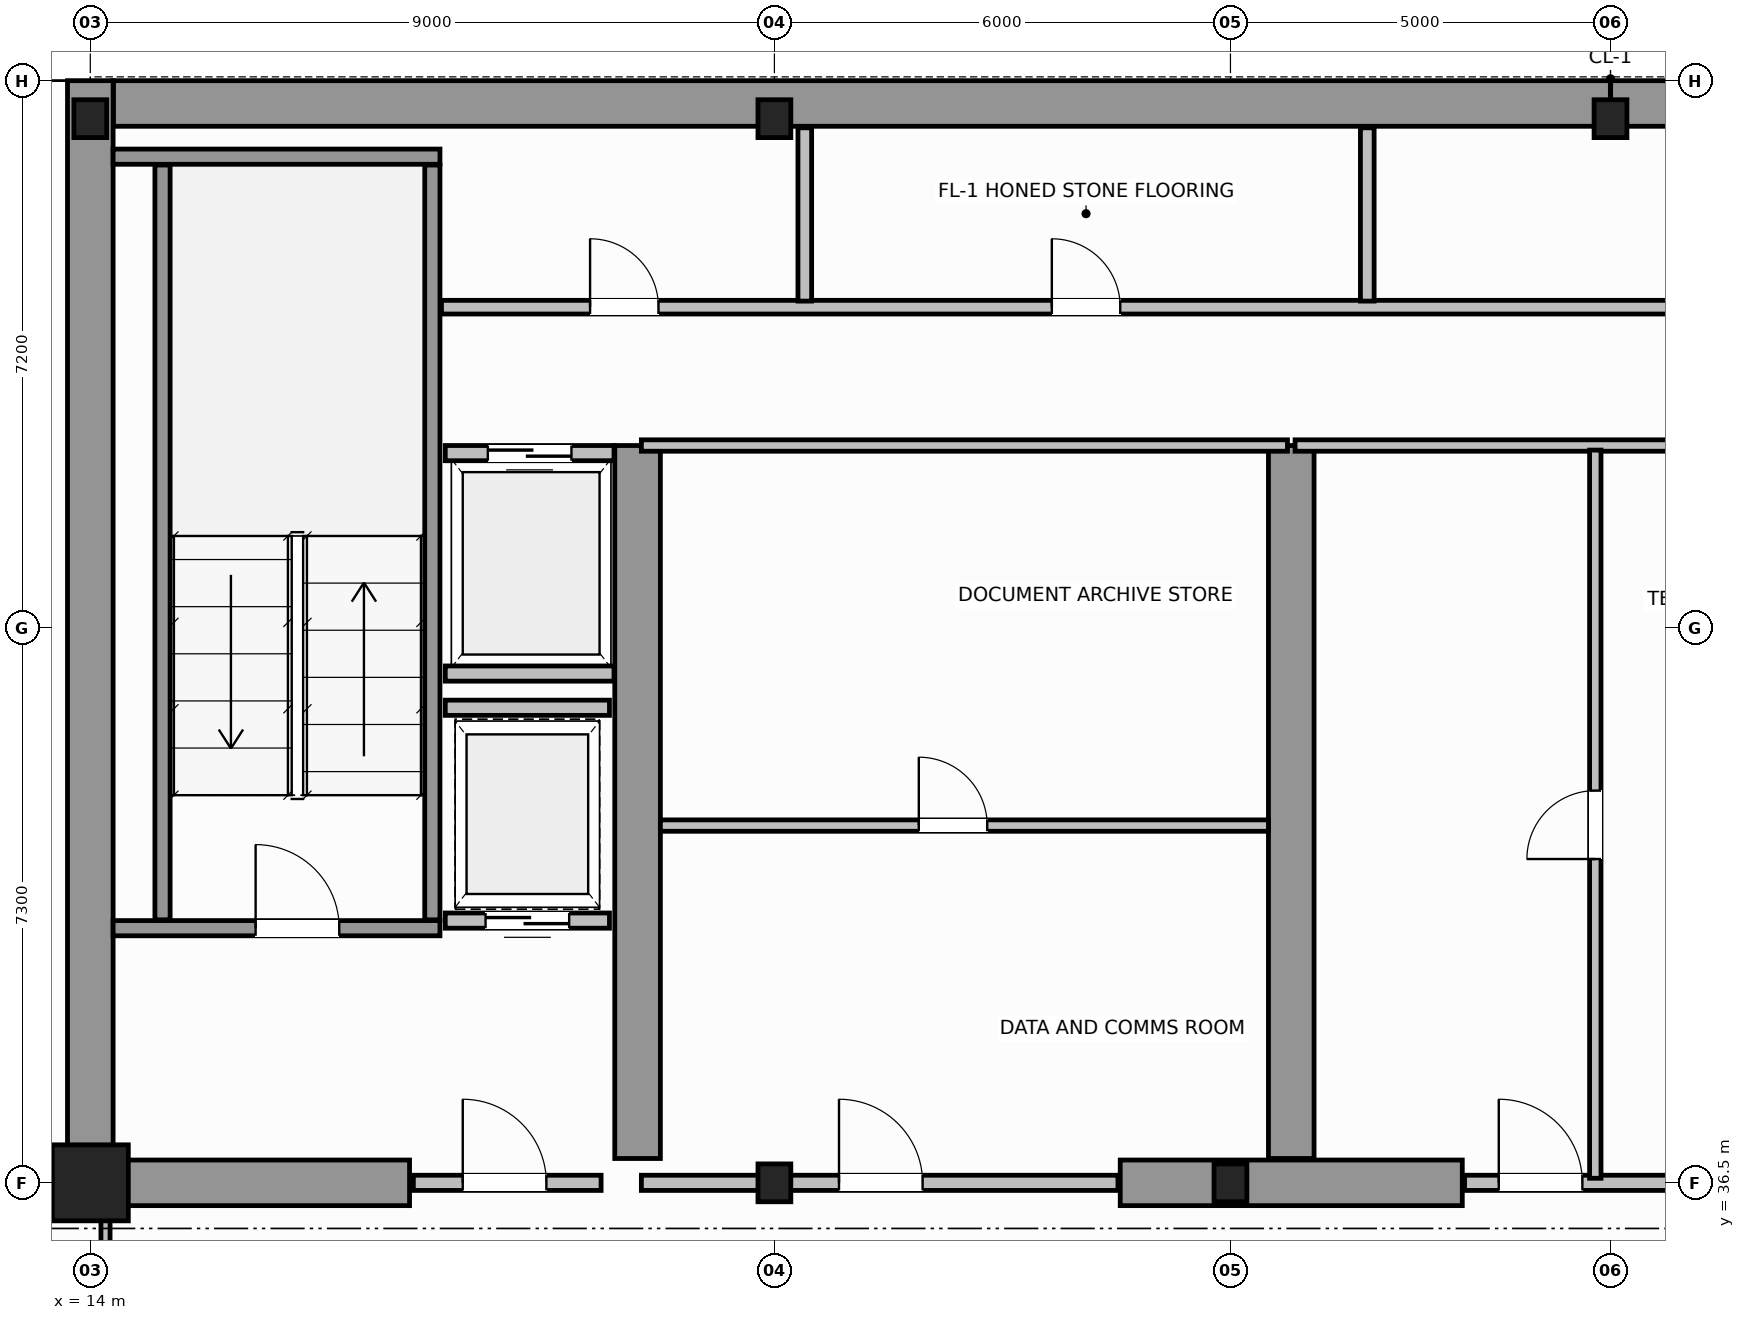
"""IFC4 building model, lengths in metres.
Left out: names, types, materials, properties, quantities, classifications, styles, units other than length and angle.
Written with IfcOpenShell. Run it as: python <this file> out.ifc"""

import sys

from ifc_helpers import new_model, si_unit, direction, frame, frame_2d, origin, origin_2d, place, context, subcontext, project, spatial, rectangle, i_section, extrude, source, transform, mapped, element, fill, save


model = new_model("IFC4")
c1 = context("Model", 3, precision=1e-05, world=origin(), true_north=direction((0.0, 1.0)))
c2 = subcontext(c1, "Body", "Model", "MODEL_VIEW")
j1 = project(units=[si_unit("LENGTHUNIT", "METRE"), si_unit("PLANEANGLEUNIT", "RADIAN")], contexts=[c1])
p1 = place(None, origin())
s1 = spatial("IfcSite", under=j1, at=p1, CompositionType="ELEMENT")
p2 = place(p1, origin())
s2 = spatial("IfcBuilding", under=s1, at=p2, CompositionType="ELEMENT")
p3 = place(p2, frame((0.0, 0.0, 207.0)))
s3 = spatial("IfcBuildingStorey", under=s2, at=p3, CompositionType="ELEMENT", Elevation=207.0)
m1 = source(origin(), c2, "Body", "SweptSolid", [
    extrude(rectangle(XDim=1.0, YDim=1.0, at=origin_2d()), origin(), (0.0, 0.0, 1.0), 3.8),
])
p4 = place(p3, frame((14.0, 36.5, 0.0), z_axis=(0.0, 0.0, 1.0), x_axis=(1.0, 0.0, 0.0)))
e1 = element("IfcColumn", 1, at=p4, inside=s3, PredefinedType="COLUMN", context=c2, shape_type="MappedRepresentation", body=[
    mapped(m1, transform((0.0, 0.0, 0.0), scale=1.0)),
])
m2 = source(origin(), c2, "Body", "SweptSolid", [
    extrude(i_section(OverallWidth=0.432, OverallDepth=0.498, WebThickness=0.055, FlangeThickness=0.068, FilletRadius=0.015, at=origin_2d()), origin(), (0.0, 0.0, 1.0), 3.8),
])
for number, where, z_axis, x_axis in (
    (2, (23.0, 36.5, 0.0), (0.0, 0.0, 1.0), (1.0, 0.0, 0.0)),
    (3, (29.0, 36.5, 0.0), (0.0, 0.0, 1.0), (1.0, 0.0, 0.0)),
    (4, (14.0, 50.5, 0.0), (0.0, 0.0, 1.0), (1.0, 0.0, 0.0)),
    (5, (23.0, 50.5, 0.0), (0.0, 0.0, 1.0), (1.0, 0.0, 0.0)),
    (6, (34.0, 50.5, 0.0), (0.0, 0.0, 1.0), (1.0, 0.0, 0.0)),
):
    element("IfcColumn", number, at=place(p3, frame(where, z_axis=z_axis, x_axis=x_axis)), inside=s3, PredefinedType="COLUMN", context=c2, shape_type="MappedRepresentation", body=[
        mapped(m2, transform((0.0, 0.0, 0.0), scale=1.0)),
    ])
for number, where, z_axis, x_axis in (
    (7, (14.304, 50.7, 0.0), (0.0, 0.0, 1.0), (1.0, 0.0, 0.0)),
    (8, (34.002, 50.7, 0.0), (0.0, 0.0, 1.0), (1.0, 0.0, 0.0)),
):
    element("IfcWall", number, at=place(p3, frame(where, z_axis=z_axis, x_axis=x_axis)), inside=s3, PredefinedType="SHEAR", context=c2, shape_type="SweptSolid", body=[
        extrude(rectangle(XDim=19.694, YDim=0.6, at=frame_2d((9.847, 0.0))), origin(), (0.0, 0.0, 1.0), 3.8),
    ])
p5 = place(p3, frame((14.0, 36.5, 0.0), z_axis=(0.0, 0.0, 1.0), x_axis=(0.0, 1.0, 0.0)))
e9 = element("IfcWall", 9, at=p5, inside=s3, PredefinedType="SHEAR", context=c2, shape_type="SweptSolid", body=[
    extrude(rectangle(XDim=14.5, YDim=0.6, at=frame_2d((7.25, 0.0))), origin(), (0.0, 0.0, 1.0), 3.8),
])
p6 = place(p3, frame((14.32, 36.5, 0.0), z_axis=(0.0, 0.0, 1.0), x_axis=(1.0, 0.0, 0.0)))
e10 = element("IfcWall", 10, at=p6, inside=s3, PredefinedType="SHEAR", context=c2, shape_type="SweptSolid", body=[
    extrude(rectangle(XDim=3.88, YDim=0.6, at=frame_2d((1.94, 0.0))), origin(), (0.0, 0.0, 1.0), 2.58),
])
p7 = place(p3, frame((27.55, 36.5, 0.0), z_axis=(0.0, 0.0, 1.0), x_axis=(1.0, 0.0, 0.0)))
e11 = element("IfcWall", 11, at=p7, inside=s3, PredefinedType="SHEAR", context=c2, shape_type="SweptSolid", body=[
    extrude(rectangle(XDim=4.5, YDim=0.6, at=frame_2d((2.25, 0.0))), origin(), (0.0, 0.0, 1.0), 3.8),
])
for number, where, z_axis, x_axis in (
    (12, (21.2, 36.82, 0.0), (0.0, 0.0, 1.0), (0.0, 1.0, 0.0)),
    (13, (29.8, 36.82, 0.0), (0.0, 0.0, 1.0), (0.0, 1.0, 0.0)),
):
    element("IfcWall", number, at=place(p3, frame(where, z_axis=z_axis, x_axis=x_axis)), inside=s3, PredefinedType="SHEAR", context=c2, shape_type="SweptSolid", body=[
        extrude(rectangle(XDim=9.38, YDim=0.6, at=frame_2d((4.69, 0.0))), origin(), (0.0, 0.0, 1.0), 3.8),
    ])
p8 = place(p3, frame((14.3, 39.85, 0.0), z_axis=(0.0, 0.0, 1.0), x_axis=(1.0, 0.0, 0.0)))
e14 = element("IfcWall", 14, at=p8, inside=s3, PredefinedType="SOLIDWALL", context=c2, shape_type="SweptSolid", body=[
    extrude(rectangle(XDim=4.3, YDim=0.2, at=frame_2d((2.15, 0.0))), origin(), (0.0, 0.0, 1.0), 3.8),
])
p9 = place(p8, frame((1.875, 0.0, 0.0)))
e15 = element("IfcOpeningElement", 15, at=p9, cuts=e14, PredefinedType="OPENING", context=c2, shape_type="SweptSolid", body=[
    extrude(rectangle(XDim=1.1, YDim=2.15, at=frame_2d((0.55, 1.075))), frame((0.0, 0.11, 0.0), z_axis=(0.0, -1.0, 0.0), x_axis=(1.0, 0.0, 0.0)), (0.0, 0.0, 1.0), 0.22),
])
p10 = place(p3, frame((14.3, 50.0, 0.0), z_axis=(0.0, 0.0, 1.0), x_axis=(1.0, 0.0, 0.0)))
e16 = element("IfcWall", 16, at=p10, inside=s3, PredefinedType="SOLIDWALL", context=c2, shape_type="SweptSolid", body=[
    extrude(rectangle(XDim=4.3, YDim=0.2, at=frame_2d((2.15, 0.0))), origin(), (0.0, 0.0, 1.0), 3.8),
])
for number, where, z_axis, x_axis in (
    (17, (14.95, 39.96, 0.0), (0.0, 0.0, 1.0), (0.0, 1.0, 0.0)),
    (18, (18.5, 39.96, 0.0), (0.0, 0.0, 1.0), (0.0, 1.0, 0.0)),
):
    element("IfcWall", number, at=place(p3, frame(where, z_axis=z_axis, x_axis=x_axis)), inside=s3, PredefinedType="SOLIDWALL", context=c2, shape_type="SweptSolid", body=[
        extrude(rectangle(XDim=9.93, YDim=0.2, at=frame_2d((4.965, 0.0))), origin(), (0.0, 0.0, 1.0), 3.8),
    ])
p11 = place(p3, frame((18.25, 36.5, 0.0), z_axis=(0.0, 0.0, 1.0), x_axis=(1.0, 0.0, 0.0)))
e19 = element("IfcWall", 19, at=p11, inside=s3, PredefinedType="SOLIDWALL", context=c2, shape_type="SweptSolid", body=[
    extrude(rectangle(XDim=2.47, YDim=0.2, at=frame_2d((1.235, 0.0))), origin(), (0.0, 0.0, 1.0), 2.57),
])
p12 = place(p11, frame((0.65, 0.0, 0.0)))
e20 = element("IfcOpeningElement", 20, at=p12, cuts=e19, PredefinedType="OPENING", context=c2, shape_type="SweptSolid", body=[
    extrude(rectangle(XDim=1.1, YDim=2.15, at=frame_2d((0.55, 1.075))), frame((0.0, 0.11, 0.0), z_axis=(0.0, -1.0, 0.0), x_axis=(1.0, 0.0, 0.0)), (0.0, 0.0, 1.0), 0.22),
])
p13 = place(p3, frame((18.67, 46.1, 0.0), z_axis=(0.0, 0.0, 1.0), x_axis=(1.0, 0.0, 0.0)))
e21 = element("IfcWall", 21, at=p13, inside=s3, PredefinedType="SOLIDWALL", context=c2, shape_type="SweptSolid", body=[
    extrude(rectangle(XDim=2.22, YDim=0.2, at=frame_2d((1.11, 0.0))), origin(), (0.0, 0.0, 1.0), 3.58),
])
p14 = place(p13, frame((0.56, 0.0, 0.0)))
e22 = element("IfcOpeningElement", 22, at=p14, cuts=e21, PredefinedType="OPENING", context=c2, shape_type="SweptSolid", body=[
    extrude(rectangle(XDim=1.1, YDim=2.15, at=frame_2d((0.55, 1.075))), frame((0.0, 0.11, 0.0), z_axis=(0.0, -1.0, 0.0), x_axis=(1.0, 0.0, 0.0)), (0.0, 0.0, 1.0), 0.22),
])
p15 = place(p3, frame((18.67, 43.2, 0.0), z_axis=(0.0, 0.0, 1.0), x_axis=(1.0, 0.0, 0.0)))
e23 = element("IfcWall", 23, at=p15, inside=s3, PredefinedType="SOLIDWALL", context=c2, shape_type="SweptSolid", body=[
    extrude(rectangle(XDim=2.22, YDim=0.2, at=frame_2d((1.11, 0.0))), origin(), (0.0, 0.0, 1.0), 3.58),
])
p16 = place(p3, frame((18.67, 39.95, 0.0), z_axis=(0.0, 0.0, 1.0), x_axis=(1.0, 0.0, 0.0)))
e24 = element("IfcWall", 24, at=p16, inside=s3, PredefinedType="SOLIDWALL", context=c2, shape_type="SweptSolid", body=[
    extrude(rectangle(XDim=2.16, YDim=0.2, at=frame_2d((1.08, 0.0))), origin(), (0.0, 0.0, 1.0), 3.58),
])
p17 = place(p16, frame((0.53, 0.0, 0.0)))
e25 = element("IfcOpeningElement", 25, at=p17, cuts=e24, PredefinedType="OPENING", context=c2, shape_type="SweptSolid", body=[
    extrude(rectangle(XDim=1.1, YDim=2.15, at=frame_2d((0.55, 1.075))), frame((0.0, 0.11, 0.0), z_axis=(0.0, -1.0, 0.0), x_axis=(1.0, 0.0, 0.0)), (0.0, 0.0, 1.0), 0.22),
])
p18 = place(p3, frame((18.67, 42.75, 0.0), z_axis=(0.0, 0.0, 1.0), x_axis=(1.0, 0.0, 0.0)))
e26 = element("IfcWall", 26, at=p18, inside=s3, PredefinedType="SOLIDWALL", context=c2, shape_type="SweptSolid", body=[
    extrude(rectangle(XDim=2.16, YDim=0.2, at=frame_2d((1.08, 0.0))), origin(), (0.0, 0.0, 1.0), 3.58),
])
p19 = place(p3, frame((21.25, 36.5, 0.0), z_axis=(0.0, 0.0, 1.0), x_axis=(1.0, 0.0, 0.0)))
e27 = element("IfcWall", 27, at=p19, inside=s3, PredefinedType="SOLIDWALL", context=c2, shape_type="SweptSolid", body=[
    extrude(rectangle(XDim=6.27, YDim=0.2, at=frame_2d((3.135, 0.0))), origin(), (0.0, 0.0, 1.0), 2.57),
])
p20 = place(p19, frame((2.6, 0.0, 0.0)))
e28 = element("IfcOpeningElement", 28, at=p20, cuts=e27, PredefinedType="OPENING", context=c2, shape_type="SweptSolid", body=[
    extrude(rectangle(XDim=1.1, YDim=2.15, at=frame_2d((0.55, 1.075))), frame((0.0, 0.11, 0.0), z_axis=(0.0, -1.0, 0.0), x_axis=(1.0, 0.0, 0.0)), (0.0, 0.0, 1.0), 0.22),
])
p21 = place(p3, frame((21.25, 46.2, 0.0), z_axis=(0.0, 0.0, 1.0), x_axis=(1.0, 0.0, 0.0)))
e29 = element("IfcWall", 29, at=p21, inside=s3, PredefinedType="PARTITIONING", context=c2, shape_type="SweptSolid", body=[
    extrude(rectangle(XDim=8.5, YDim=0.15, at=frame_2d((4.25, 0.0))), origin(), (0.0, 0.0, 1.0), 3.58),
])
p22 = place(p3, frame((21.5, 41.2, 0.0), z_axis=(0.0, 0.0, 1.0), x_axis=(1.0, 0.0, 0.0)))
e30 = element("IfcWall", 30, at=p22, inside=s3, PredefinedType="PARTITIONING", context=c2, shape_type="SweptSolid", body=[
    extrude(rectangle(XDim=8.0, YDim=0.15, at=frame_2d((4.0, 0.0))), origin(), (0.0, 0.0, 1.0), 3.58),
])
p23 = place(p22, frame((3.4, 0.0, 0.0)))
e31 = element("IfcOpeningElement", 31, at=p23, cuts=e30, PredefinedType="OPENING", context=c2, shape_type="SweptSolid", body=[
    extrude(rectangle(XDim=0.9, YDim=2.1, at=frame_2d((0.45, 1.05))), frame((0.0, 0.085, 0.0), z_axis=(0.0, -1.0, 0.0), x_axis=(1.0, 0.0, 0.0)), (0.0, 0.0, 1.0), 0.17),
])
p24 = place(p3, frame((32.08, 36.5, 0.0), z_axis=(0.0, 0.0, 1.0), x_axis=(1.0, 0.0, 0.0)))
e32 = element("IfcWall", 32, at=p24, inside=s3, PredefinedType="SOLIDWALL", context=c2, shape_type="SweptSolid", body=[
    extrude(rectangle(XDim=4.04, YDim=0.2, at=frame_2d((2.02, 0.0))), origin(), (0.0, 0.0, 1.0), 2.97),
])
p25 = place(p24, frame((0.45, 0.0, 0.0)))
e33 = element("IfcOpeningElement", 33, at=p25, cuts=e32, PredefinedType="OPENING", context=c2, shape_type="SweptSolid", body=[
    extrude(rectangle(XDim=1.1, YDim=2.15, at=frame_2d((0.55, 1.075))), frame((0.0, 0.11, 0.0), z_axis=(0.0, -1.0, 0.0), x_axis=(1.0, 0.0, 0.0)), (0.0, 0.0, 1.0), 0.22),
])
p26 = place(p3, frame((29.85, 46.2, 0.0), z_axis=(0.0, 0.0, 1.0), x_axis=(1.0, 0.0, 0.0)))
e34 = element("IfcWall", 34, at=p26, inside=s3, PredefinedType="PARTITIONING", context=c2, shape_type="SweptSolid", body=[
    extrude(rectangle(XDim=8.5, YDim=0.15, at=frame_2d((4.25, 0.0))), origin(), (0.0, 0.0, 1.0), 3.58),
])
p27 = place(p3, frame((33.8, 36.56, 0.0), z_axis=(0.0, 0.0, 1.0), x_axis=(0.0, 1.0, 0.0)))
e35 = element("IfcWall", 35, at=p27, inside=s3, PredefinedType="PARTITIONING", context=c2, shape_type="SweptSolid", body=[
    extrude(rectangle(XDim=9.58, YDim=0.15, at=frame_2d((4.79, 0.0))), origin(), (0.0, 0.0, 1.0), 3.58),
])
p28 = place(p27, frame((4.2, 0.0, 0.0)))
e36 = element("IfcOpeningElement", 36, at=p28, cuts=e35, PredefinedType="OPENING", context=c2, shape_type="SweptSolid", body=[
    extrude(rectangle(XDim=0.9, YDim=2.1, at=frame_2d((0.45, 1.05))), frame((0.0, 0.085, 0.0), z_axis=(0.0, -1.0, 0.0), x_axis=(1.0, 0.0, 0.0)), (0.0, 0.0, 1.0), 0.17),
])
p29 = place(p3, frame((18.62, 48.02, 0.0), z_axis=(0.0, 0.0, 1.0), x_axis=(1.0, 0.0, 0.0)))
e37 = element("IfcWall", 37, at=p29, inside=s3, PredefinedType="PLUMBINGWALL", context=c2, shape_type="SweptSolid", body=[
    extrude(rectangle(XDim=30.76, YDim=0.18, at=frame_2d((15.38, 0.0))), origin(), (0.0, 0.0, 1.0), 3.58),
])
p30 = place(p29, frame((1.955, 0.0, 0.0)))
e38 = element("IfcOpeningElement", 38, at=p30, cuts=e37, PredefinedType="OPENING", context=c2, shape_type="SweptSolid", body=[
    extrude(rectangle(XDim=0.9, YDim=2.15, at=frame_2d((0.45, 1.075))), frame((0.0, 0.1, 0.0), z_axis=(0.0, -1.0, 0.0), x_axis=(1.0, 0.0, 0.0)), (0.0, 0.0, 1.0), 0.2),
])
p31 = place(p29, frame((8.03, 0.0, 0.0)))
e39 = element("IfcOpeningElement", 39, at=p31, cuts=e37, PredefinedType="OPENING", context=c2, shape_type="SweptSolid", body=[
    extrude(rectangle(XDim=0.9, YDim=2.15, at=frame_2d((0.45, 1.075))), frame((0.0, 0.1, 0.0), z_axis=(0.0, -1.0, 0.0), x_axis=(1.0, 0.0, 0.0)), (0.0, 0.0, 1.0), 0.2),
])
p32 = place(p29, frame((16.93, 0.0, 0.0)))
e40 = element("IfcOpeningElement", 40, at=p32, cuts=e37, PredefinedType="OPENING", context=c2, shape_type="SweptSolid", body=[
    extrude(rectangle(XDim=0.9, YDim=2.15, at=frame_2d((0.45, 1.075))), frame((0.0, 0.1, 0.0), z_axis=(0.0, -1.0, 0.0), x_axis=(1.0, 0.0, 0.0)), (0.0, 0.0, 1.0), 0.2),
])
p33 = place(p29, frame((26.205, 0.0, 0.0)))
e41 = element("IfcOpeningElement", 41, at=p33, cuts=e37, PredefinedType="OPENING", context=c2, shape_type="SweptSolid", body=[
    extrude(rectangle(XDim=0.9, YDim=2.15, at=frame_2d((0.45, 1.075))), frame((0.0, 0.1, 0.0), z_axis=(0.0, -1.0, 0.0), x_axis=(1.0, 0.0, 0.0)), (0.0, 0.0, 1.0), 0.2),
])
for number, where, z_axis, x_axis in (
    (42, (23.4, 48.1, 0.0), (0.0, 0.0, 1.0), (0.0, 1.0, 0.0)),
    (43, (30.8, 48.1, 0.0), (0.0, 0.0, 1.0), (0.0, 1.0, 0.0)),
):
    element("IfcWall", number, at=place(p3, frame(where, z_axis=z_axis, x_axis=x_axis)), inside=s3, PredefinedType="PLUMBINGWALL", context=c2, shape_type="SweptSolid", body=[
        extrude(rectangle(XDim=2.28, YDim=0.18, at=frame_2d((1.14, 0.0))), origin(), (0.0, 0.0, 1.0), 3.58),
    ])
p34 = place(p3, frame((14.2, 34.0, 0.0), z_axis=(0.0, 0.0, 1.0), x_axis=(0.0, 1.0, 0.0)))
e44 = element("IfcWall", 44, at=p34, inside=s3, PredefinedType="PARTITIONING", context=c2, shape_type="SweptSolid", body=[
    extrude(rectangle(XDim=2.44, YDim=0.12, at=frame_2d((1.22, 0.0))), origin(), (0.0, 0.0, 1.0), 3.58),
])
p35 = place(p34, frame((0.7, 0.0, 0.0)))
e45 = element("IfcOpeningElement", 45, at=p35, cuts=e44, PredefinedType="OPENING", context=c2, shape_type="SweptSolid", body=[
    extrude(rectangle(XDim=0.9, YDim=2.15, at=frame_2d((0.45, 1.075))), frame((0.0, 0.07, 0.0), z_axis=(0.0, -1.0, 0.0), x_axis=(1.0, 0.0, 0.0)), (0.0, 0.0, 1.0), 0.14),
])
m3 = source(origin(), c2, "Body", "SweptSolid", [
    extrude(rectangle(XDim=1.1, YDim=2.15, at=frame_2d((0.55, 1.075))), frame((0.0, 0.025, 0.0), z_axis=(0.0, -1.0, 0.0), x_axis=(1.0, 0.0, 0.0)), (0.0, 0.0, 1.0), 0.05),
])
p36 = place(p9, origin())
e46 = element("IfcDoor", 46, at=p36, inside=s3, OperationType="SINGLE_SWING_LEFT", PredefinedType="DOOR", context=c2, shape_type="MappedRepresentation", body=[
    mapped(m3, transform((0.0, 0.0, 0.0), scale=1.0)),
])
fill(e15, e46)
p37 = place(p12, origin())
e47 = element("IfcDoor", 47, at=p37, inside=s3, OperationType="SINGLE_SWING_RIGHT", PredefinedType="DOOR", context=c2, shape_type="MappedRepresentation", body=[
    mapped(m3, transform((0.0, 0.0, 0.0), scale=1.0)),
])
fill(e20, e47)
p38 = place(p14, origin())
e48 = element("IfcDoor", 48, at=p38, inside=s3, OperationType="DOUBLE_DOOR_SLIDING", PredefinedType="DOOR", context=c2, shape_type="MappedRepresentation", body=[
    mapped(m3, transform((0.0, 0.0, 0.0), scale=1.0)),
])
fill(e22, e48)
p39 = place(p17, origin())
e49 = element("IfcDoor", 49, at=p39, inside=s3, OperationType="DOUBLE_DOOR_SLIDING", PredefinedType="DOOR", context=c2, shape_type="MappedRepresentation", body=[
    mapped(m3, transform((0.0, 0.0, 0.0), scale=1.0)),
])
fill(e25, e49)
p40 = place(p20, origin())
e50 = element("IfcDoor", 50, at=p40, inside=s3, OperationType="SINGLE_SWING_LEFT", PredefinedType="DOOR", context=c2, shape_type="MappedRepresentation", body=[
    mapped(m3, transform((0.0, 0.0, 0.0), scale=1.0)),
])
fill(e28, e50)
m4 = source(origin(), c2, "Body", "SweptSolid", [
    extrude(rectangle(XDim=0.9, YDim=2.1, at=frame_2d((0.45, 1.05))), frame((0.0, 0.025, 0.0), z_axis=(0.0, -1.0, 0.0), x_axis=(1.0, 0.0, 0.0)), (0.0, 0.0, 1.0), 0.05),
])
p41 = place(p23, origin())
e51 = element("IfcDoor", 51, at=p41, inside=s3, OperationType="SINGLE_SWING_RIGHT", PredefinedType="DOOR", context=c2, shape_type="MappedRepresentation", body=[
    mapped(m4, transform((0.0, 0.0, 0.0), scale=1.0)),
])
fill(e31, e51)
p42 = place(p25, origin())
e52 = element("IfcDoor", 52, at=p42, inside=s3, OperationType="SINGLE_SWING_LEFT", PredefinedType="DOOR", context=c2, shape_type="MappedRepresentation", body=[
    mapped(m3, transform((0.0, 0.0, 0.0), scale=1.0)),
])
fill(e33, e52)
p43 = place(p28, origin())
e53 = element("IfcDoor", 53, at=p43, inside=s3, OperationType="SINGLE_SWING_RIGHT", PredefinedType="DOOR", context=c2, shape_type="MappedRepresentation", body=[
    mapped(m4, transform((0.0, 0.0, 0.0), scale=1.0)),
])
fill(e36, e53)
m5 = source(origin(), c2, "Body", "SweptSolid", [
    extrude(rectangle(XDim=0.9, YDim=2.15, at=frame_2d((0.45, 1.075))), frame((0.0, 0.025, 0.0), z_axis=(0.0, -1.0, 0.0), x_axis=(1.0, 0.0, 0.0)), (0.0, 0.0, 1.0), 0.05),
])
p44 = place(p30, origin())
e54 = element("IfcDoor", 54, at=p44, inside=s3, OperationType="SINGLE_SWING_LEFT", PredefinedType="DOOR", context=c2, shape_type="MappedRepresentation", body=[
    mapped(m5, transform((0.0, 0.0, 0.0), scale=1.0)),
])
fill(e38, e54)
p45 = place(p31, origin())
e55 = element("IfcDoor", 55, at=p45, inside=s3, OperationType="SINGLE_SWING_RIGHT", PredefinedType="DOOR", context=c2, shape_type="MappedRepresentation", body=[
    mapped(m5, transform((0.0, 0.0, 0.0), scale=1.0)),
])
fill(e39, e55)
save(model, sys.argv[1])
